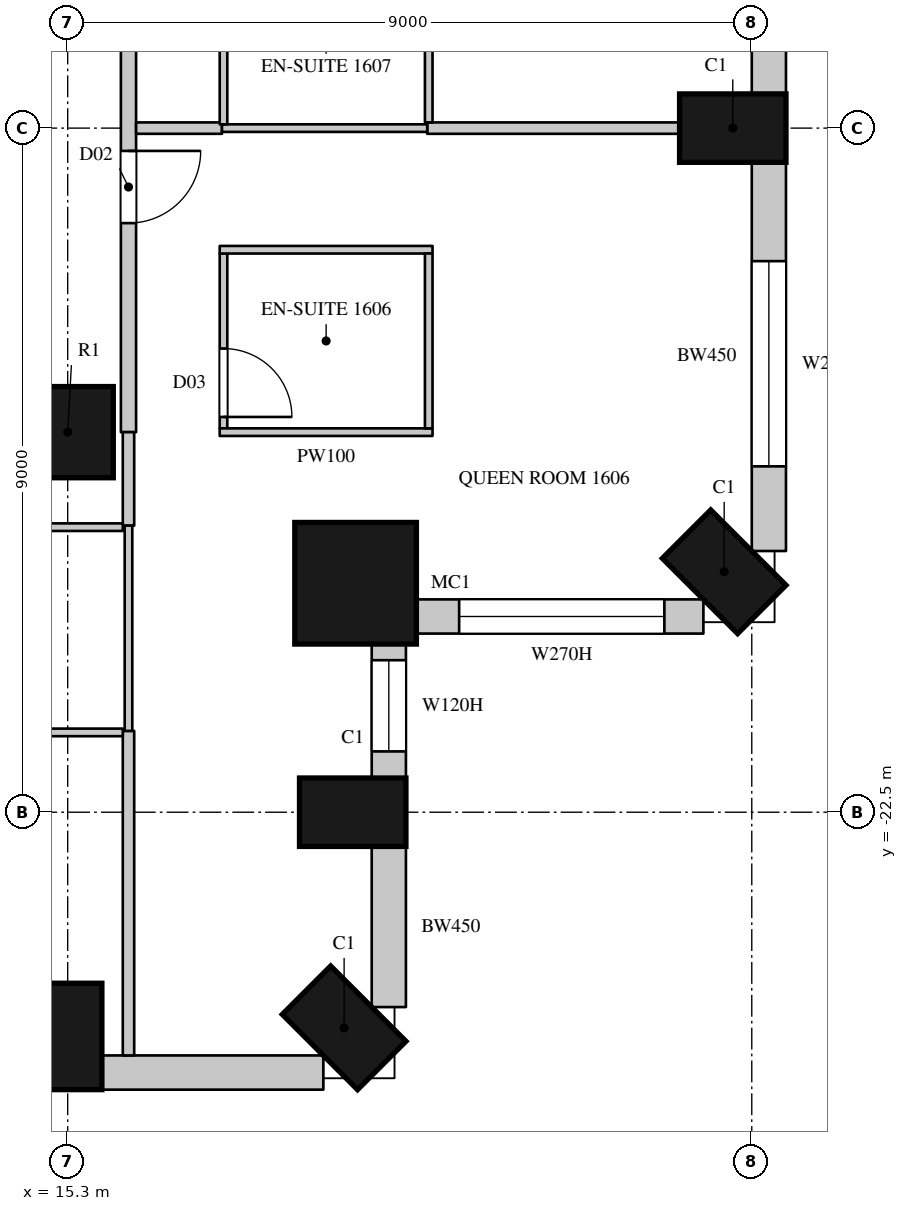
"""IFC4 building model, lengths in metres.
Left out: names, types, materials, properties, quantities, classifications, styles, units other than length and angle.
Written with IfcOpenShell. Run it as: python <this file> out.ifc"""

import sys

from ifc_helpers import new_model, si_unit, direction, frame, frame_2d, origin, origin_2d, place, context, subcontext, project, spatial, rectangle, circle, extrude, element, fill, save


model = new_model("IFC4")
c1 = context("Model", 3, precision=1e-05, world=origin(), true_north=direction((0.0, 1.0)))
c2 = subcontext(c1, "Body", "Model", "MODEL_VIEW")
j1 = project(units=[si_unit("LENGTHUNIT", "METRE"), si_unit("PLANEANGLEUNIT", "RADIAN")], contexts=[c1])
p1 = place(None, origin())
s1 = spatial("IfcSite", under=j1, at=p1, CompositionType="ELEMENT")
p2 = place(p1, origin())
s2 = spatial("IfcBuilding", under=s1, at=p2, CompositionType="ELEMENT")
p3 = place(p2, frame((0.0, 0.0, 87.9)))
s3 = spatial("IfcBuildingStorey", under=s2, at=p3, CompositionType="ELEMENT", Elevation=87.9)
for number, where, z_axis, x_axis in (
    (1, (15.3, -25.45, 0.0), (0.0, 0.0, 1.0), (1.0, 0.0, 0.0)),
    (2, (18.937, -25.337, 0.0), (0.0, 0.0, 1.0), (0.707, 0.707, 0.0)),
    (3, (19.05, -22.5, 0.0), (0.0, 0.0, 1.0), (0.0, 1.0, 0.0)),
):
    element("IfcColumn", number, at=place(p3, frame(where, z_axis=z_axis, x_axis=x_axis)), inside=s3, PredefinedType="COLUMN", context=c2, shape_type="SweptSolid", body=[
        extrude(rectangle(XDim=0.9, YDim=1.4, at=origin_2d()), origin(), (0.0, 0.0, 1.0), 3.6),
    ])
p4 = place(p3, frame((19.088, -19.488, 0.0), z_axis=(0.0, 0.0, 1.0), x_axis=(1.0, 0.0, 0.0)))
e4 = element("IfcColumn", 4, at=p4, inside=s3, PredefinedType="COLUMN", context=c2, shape_type="SweptSolid", body=[
    extrude(circle(Radius=0.8, at=origin_2d()), origin(), (0.0, 0.0, 1.0), 3.6),
])
for number, where, z_axis, x_axis in (
    (5, (23.937, -19.337, 0.0), (0.0, 0.0, 1.0), (0.707, 0.707, 0.0)),
    (6, (24.05, -13.5, 0.0), (0.0, 0.0, 1.0), (0.0, 1.0, 0.0)),
):
    element("IfcColumn", number, at=place(p3, frame(where, z_axis=z_axis, x_axis=x_axis)), inside=s3, PredefinedType="COLUMN", context=c2, shape_type="SweptSolid", body=[
        extrude(rectangle(XDim=0.9, YDim=1.4, at=origin_2d()), origin(), (0.0, 0.0, 1.0), 3.6),
    ])
p5 = place(p3, frame((15.3, -17.5, 0.0), z_axis=(0.0, 0.0, 1.0), x_axis=(1.0, 0.0, 0.0)))
e7 = element("IfcColumn", 7, at=p5, inside=s3, PredefinedType="COLUMN", context=c2, shape_type="SweptSolid", body=[
    extrude(circle(Radius=0.6, at=origin_2d()), origin(), (0.0, 0.0, 1.0), 3.6),
])
p6 = place(p3, frame((15.75, -25.925, 0.0), z_axis=(0.0, 0.0, 1.0), x_axis=(1.0, 0.0, 0.0)))
e8 = element("IfcWall", 8, at=p6, inside=s3, PredefinedType="SOLIDWALL", context=c2, shape_type="SweptSolid", body=[
    extrude(rectangle(XDim=2.914, YDim=0.45, at=frame_2d((1.457, 0.0))), origin(), (0.0, 0.0, 1.0), 3.3),
])
p7 = place(p3, frame((19.525, -25.064, 0.0), z_axis=(0.0, 0.0, 1.0), x_axis=(0.0, 1.0, 0.0)))
e9 = element("IfcWall", 9, at=p7, inside=s3, PredefinedType="SOLIDWALL", context=c2, shape_type="SweptSolid", body=[
    extrude(rectangle(XDim=2.114, YDim=0.45, at=frame_2d((1.057, 0.0))), origin(), (0.0, 0.0, 1.0), 3.3),
])
p8 = place(p3, frame((19.525, -22.05, 0.0), z_axis=(0.0, 0.0, 1.0), x_axis=(0.0, 1.0, 0.0)))
e10 = element("IfcWall", 10, at=p8, inside=s3, PredefinedType="SOLIDWALL", context=c2, shape_type="SweptSolid", body=[
    extrude(rectangle(XDim=1.792, YDim=0.45, at=frame_2d((0.896, 0.0))), origin(), (0.0, 0.0, 1.0), 3.3),
])
p9 = place(p8, frame((0.35, 0.0, 1.05)))
e11 = element("IfcOpeningElement", 11, at=p9, cuts=e10, PredefinedType="OPENING", context=c2, shape_type="SweptSolid", body=[
    extrude(rectangle(XDim=1.2, YDim=2.0, at=frame_2d((0.6, 1.0))), frame((0.0, 0.235, 0.0), z_axis=(0.0, -1.0, 0.0), x_axis=(1.0, 0.0, 0.0)), (0.0, 0.0, 1.0), 0.47),
])
p10 = place(p3, frame((19.858, -19.925, 0.0), z_axis=(0.0, 0.0, 1.0), x_axis=(1.0, 0.0, 0.0)))
e12 = element("IfcWall", 12, at=p10, inside=s3, PredefinedType="SOLIDWALL", context=c2, shape_type="SweptSolid", body=[
    extrude(rectangle(XDim=3.805, YDim=0.45, at=frame_2d((1.903, 0.0))), origin(), (0.0, 0.0, 1.0), 3.3),
])
p11 = place(p10, frame((0.592, 0.0, 1.05)))
e13 = element("IfcOpeningElement", 13, at=p11, cuts=e12, PredefinedType="OPENING", context=c2, shape_type="SweptSolid", body=[
    extrude(rectangle(XDim=2.7, YDim=2.0, at=frame_2d((1.35, 1.0))), frame((0.0, 0.235, 0.0), z_axis=(0.0, -1.0, 0.0), x_axis=(1.0, 0.0, 0.0)), (0.0, 0.0, 1.0), 0.47),
])
p12 = place(p3, frame((24.525, -19.064, 0.0), z_axis=(0.0, 0.0, 1.0), x_axis=(0.0, 1.0, 0.0)))
e14 = element("IfcWall", 14, at=p12, inside=s3, PredefinedType="SOLIDWALL", context=c2, shape_type="SweptSolid", body=[
    extrude(rectangle(XDim=5.114, YDim=0.45, at=frame_2d((2.557, 0.0))), origin(), (0.0, 0.0, 1.0), 3.3),
])
p13 = place(p12, frame((1.114, 0.0, 1.05)))
e15 = element("IfcOpeningElement", 15, at=p13, cuts=e14, PredefinedType="OPENING", context=c2, shape_type="SweptSolid", body=[
    extrude(rectangle(XDim=2.7, YDim=2.0, at=frame_2d((1.35, 1.0))), frame((0.0, 0.235, 0.0), z_axis=(0.0, -1.0, 0.0), x_axis=(1.0, 0.0, 0.0)), (0.0, 0.0, 1.0), 0.47),
])
p14 = place(p3, frame((24.525, -13.05, 0.0), z_axis=(0.0, 0.0, 1.0), x_axis=(0.0, 1.0, 0.0)))
e16 = element("IfcWall", 16, at=p14, inside=s3, PredefinedType="SOLIDWALL", context=c2, shape_type="SweptSolid", body=[
    extrude(rectangle(XDim=8.1, YDim=0.45, at=frame_2d((4.05, 0.0))), origin(), (0.0, 0.0, 1.0), 3.3),
])
p15 = place(p14, frame((0.9, 0.0, 0.0)))
e17 = element("IfcOpeningElement", 17, at=p15, cuts=e16, PredefinedType="OPENING", context=c2, shape_type="SweptSolid", body=[
    extrude(rectangle(XDim=1.8, YDim=2.4, at=frame_2d((0.9, 1.2))), frame((0.0, 0.235, 0.0), z_axis=(0.0, -1.0, 0.0), x_axis=(1.0, 0.0, 0.0)), (0.0, 0.0, 1.0), 0.47),
])
p16 = place(p14, frame((4.7, 0.0, 0.0)))
e18 = element("IfcOpeningElement", 18, at=p16, cuts=e16, PredefinedType="OPENING", context=c2, shape_type="SweptSolid", body=[
    extrude(rectangle(XDim=1.8, YDim=2.4, at=frame_2d((0.9, 1.2))), frame((0.0, 0.235, 0.0), z_axis=(0.0, -1.0, 0.0), x_axis=(1.0, 0.0, 0.0)), (0.0, 0.0, 1.0), 0.47),
])
p17 = place(p14, frame((6.7, 0.0, 1.05)))
e19 = element("IfcOpeningElement", 19, at=p17, cuts=e16, PredefinedType="OPENING", context=c2, shape_type="SweptSolid", body=[
    extrude(rectangle(XDim=1.2, YDim=2.0, at=frame_2d((0.6, 1.0))), frame((0.0, 0.235, 0.0), z_axis=(0.0, -1.0, 0.0), x_axis=(1.0, 0.0, 0.0)), (0.0, 0.0, 1.0), 0.47),
])
p18 = place(p3, frame((16.1, -17.5, 0.0), z_axis=(0.0, 0.0, 1.0), x_axis=(0.0, 1.0, 0.0)))
e20 = element("IfcWall", 20, at=p18, inside=s3, PredefinedType="PARTITIONING", context=c2, shape_type="SweptSolid", body=[
    extrude(rectangle(XDim=12.75, YDim=0.2, at=frame_2d((6.375, 0.0))), origin(), (0.0, 0.0, 1.0), 3.3),
])
p19 = place(p18, frame((2.75, 0.0, 0.0)))
e21 = element("IfcOpeningElement", 21, at=p19, cuts=e20, PredefinedType="OPENING", context=c2, shape_type="SweptSolid", body=[
    extrude(rectangle(XDim=0.95, YDim=2.2, at=frame_2d((0.475, 1.1))), frame((0.0, 0.11, 0.0), z_axis=(0.0, -1.0, 0.0), x_axis=(1.0, 0.0, 0.0)), (0.0, 0.0, 1.0), 0.22),
])
p20 = place(p18, frame((6.95, 0.0, 0.0)))
e22 = element("IfcOpeningElement", 22, at=p20, cuts=e20, PredefinedType="OPENING", context=c2, shape_type="SweptSolid", body=[
    extrude(rectangle(XDim=0.95, YDim=2.2, at=frame_2d((0.475, 1.1))), frame((0.0, 0.11, 0.0), z_axis=(0.0, -1.0, 0.0), x_axis=(1.0, 0.0, 0.0)), (0.0, 0.0, 1.0), 0.22),
])
p21 = place(p18, frame((11.4, 0.0, 0.0)))
e23 = element("IfcOpeningElement", 23, at=p21, cuts=e20, PredefinedType="OPENING", context=c2, shape_type="SweptSolid", body=[
    extrude(rectangle(XDim=0.95, YDim=2.2, at=frame_2d((0.475, 1.1))), frame((0.0, 0.11, 0.0), z_axis=(0.0, -1.0, 0.0), x_axis=(1.0, 0.0, 0.0)), (0.0, 0.0, 1.0), 0.22),
])
p22 = place(p3, frame((16.1, -25.7, 0.0), z_axis=(0.0, 0.0, 1.0), x_axis=(0.0, 1.0, 0.0)))
e24 = element("IfcWall", 24, at=p22, inside=s3, PredefinedType="PARTITIONING", context=c2, shape_type="SweptSolid", body=[
    extrude(rectangle(XDim=4.27, YDim=0.15, at=frame_2d((2.135, 0.0))), origin(), (0.0, 0.0, 1.0), 3.3),
])
p23 = place(p3, frame((16.1, -18.73, 0.0), z_axis=(0.0, 0.0, 1.0), x_axis=(0.0, 1.0, 0.0)))
e25 = element("IfcWall", 25, at=p23, inside=s3, PredefinedType="PARTITIONING", context=c2, shape_type="SweptSolid", body=[
    extrude(rectangle(XDim=1.23, YDim=0.15, at=frame_2d((0.615, 0.0))), origin(), (0.0, 0.0, 1.0), 3.3),
])
p24 = place(p3, frame((16.2, -13.5, 0.0), z_axis=(0.0, 0.0, 1.0), x_axis=(1.0, 0.0, 0.0)))
e26 = element("IfcWall", 26, at=p24, inside=s3, PredefinedType="PARTITIONING", context=c2, shape_type="SweptSolid", body=[
    extrude(rectangle(XDim=1.13, YDim=0.15, at=frame_2d((0.565, 0.0))), origin(), (0.0, 0.0, 1.0), 3.3),
])
p25 = place(p3, frame((20.03, -13.5, 0.0), z_axis=(0.0, 0.0, 1.0), x_axis=(1.0, 0.0, 0.0)))
e27 = element("IfcWall", 27, at=p25, inside=s3, PredefinedType="PARTITIONING", context=c2, shape_type="SweptSolid", body=[
    extrude(rectangle(XDim=3.32, YDim=0.15, at=frame_2d((1.66, 0.0))), origin(), (0.0, 0.0, 1.0), 3.3),
])
for number, where, z_axis, x_axis in (
    (28, (13.65, -21.45, 0.0), (0.0, 0.0, 1.0), (1.0, 0.0, 0.0)),
    (29, (13.65, -18.75, 0.0), (0.0, 0.0, 1.0), (1.0, 0.0, 0.0)),
):
    element("IfcWall", number, at=place(p3, frame(where, z_axis=z_axis, x_axis=x_axis)), inside=s3, PredefinedType="PARTITIONING", context=c2, shape_type="SweptSolid", body=[
        extrude(rectangle(XDim=2.375, YDim=0.1, at=frame_2d((1.188, 0.0))), origin(), (0.0, 0.0, 1.0), 3.3),
    ])
for number, where, z_axis, x_axis in (
    (30, (16.1, -21.43, 0.0), (0.0, 0.0, 1.0), (0.0, 1.0, 0.0)),
    (31, (17.33, -13.5, 0.0), (0.0, 0.0, 1.0), (1.0, 0.0, 0.0)),
):
    element("IfcWall", number, at=place(p3, frame(where, z_axis=z_axis, x_axis=x_axis)), inside=s3, PredefinedType="PARTITIONING", context=c2, shape_type="SweptSolid", body=[
        extrude(rectangle(XDim=2.7, YDim=0.1, at=frame_2d((1.35, 0.0))), origin(), (0.0, 0.0, 1.0), 3.3),
    ])
p26 = place(p3, frame((17.35, -17.45, 0.0), z_axis=(0.0, 0.0, 1.0), x_axis=(0.0, 1.0, 0.0)))
e32 = element("IfcWall", 32, at=p26, inside=s3, PredefinedType="PARTITIONING", context=c2, shape_type="SweptSolid", body=[
    extrude(rectangle(XDim=2.3, YDim=0.1, at=frame_2d((1.15, 0.0))), origin(), (0.0, 0.0, 1.0), 3.3),
])
p27 = place(p26, frame((0.15, 0.0, 0.0)))
e33 = element("IfcOpeningElement", 33, at=p27, cuts=e32, PredefinedType="OPENING", context=c2, shape_type="SweptSolid", body=[
    extrude(rectangle(XDim=0.9, YDim=2.2, at=frame_2d((0.45, 1.1))), frame((0.0, 0.06, 0.0), z_axis=(0.0, -1.0, 0.0), x_axis=(1.0, 0.0, 0.0)), (0.0, 0.0, 1.0), 0.12),
])
for number, where, z_axis, x_axis in (
    (34, (17.3, -17.5, 0.0), (0.0, 0.0, 1.0), (1.0, 0.0, 0.0)),
    (35, (17.3, -15.1, 0.0), (0.0, 0.0, 1.0), (1.0, 0.0, 0.0)),
):
    element("IfcWall", number, at=place(p3, frame(where, z_axis=z_axis, x_axis=x_axis)), inside=s3, PredefinedType="PARTITIONING", context=c2, shape_type="SweptSolid", body=[
        extrude(rectangle(XDim=2.8, YDim=0.1, at=frame_2d((1.4, 0.0))), origin(), (0.0, 0.0, 1.0), 3.3),
    ])
p28 = place(p3, frame((17.35, -13.45, 0.0), z_axis=(0.0, 0.0, 1.0), x_axis=(0.0, 1.0, 0.0)))
e36 = element("IfcWall", 36, at=p28, inside=s3, PredefinedType="PARTITIONING", context=c2, shape_type="SweptSolid", body=[
    extrude(rectangle(XDim=2.296, YDim=0.1, at=frame_2d((1.148, 0.0))), origin(), (0.0, 0.0, 1.0), 3.3),
])
p29 = place(p28, frame((1.2, 0.0, 0.0)))
e37 = element("IfcOpeningElement", 37, at=p29, cuts=e36, PredefinedType="OPENING", context=c2, shape_type="SweptSolid", body=[
    extrude(rectangle(XDim=0.9, YDim=2.2, at=frame_2d((0.45, 1.1))), frame((0.0, 0.06, 0.0), z_axis=(0.0, -1.0, 0.0), x_axis=(1.0, 0.0, 0.0)), (0.0, 0.0, 1.0), 0.12),
])
p30 = place(p3, frame((20.05, -17.45, 0.0), z_axis=(0.0, 0.0, 1.0), x_axis=(0.0, 1.0, 0.0)))
e38 = element("IfcWall", 38, at=p30, inside=s3, PredefinedType="PARTITIONING", context=c2, shape_type="SweptSolid", body=[
    extrude(rectangle(XDim=2.3, YDim=0.1, at=frame_2d((1.15, 0.0))), origin(), (0.0, 0.0, 1.0), 3.3),
])
p31 = place(p3, frame((20.05, -13.425, 0.0), z_axis=(0.0, 0.0, 1.0), x_axis=(0.0, 1.0, 0.0)))
e39 = element("IfcWall", 39, at=p31, inside=s3, PredefinedType="PARTITIONING", context=c2, shape_type="SweptSolid", body=[
    extrude(rectangle(XDim=2.271, YDim=0.1, at=frame_2d((1.135, 0.0))), origin(), (0.0, 0.0, 1.0), 3.3),
])
p32 = place(p9, origin())
e40 = element("IfcWindow", 40, at=p32, inside=s3, PartitioningType="SINGLE_PANEL", PredefinedType="WINDOW", context=c2, shape_type="SweptSolid", body=[
    extrude(rectangle(XDim=1.2, YDim=2.0, at=frame_2d((0.6, 1.0))), frame((0.0, 0.135, 0.0), z_axis=(0.0, -1.0, 0.0), x_axis=(1.0, 0.0, 0.0)), (0.0, 0.0, 1.0), 0.06),
])
fill(e11, e40)
p33 = place(p11, origin())
e41 = element("IfcWindow", 41, at=p33, inside=s3, PartitioningType="SINGLE_PANEL", PredefinedType="WINDOW", context=c2, shape_type="SweptSolid", body=[
    extrude(rectangle(XDim=2.7, YDim=2.0, at=frame_2d((1.35, 1.0))), frame((0.0, 0.135, 0.0), z_axis=(0.0, -1.0, 0.0), x_axis=(1.0, 0.0, 0.0)), (0.0, 0.0, 1.0), 0.06),
])
fill(e13, e41)
p34 = place(p13, origin())
e42 = element("IfcWindow", 42, at=p34, inside=s3, PartitioningType="SINGLE_PANEL", PredefinedType="WINDOW", context=c2, shape_type="SweptSolid", body=[
    extrude(rectangle(XDim=2.7, YDim=2.0, at=frame_2d((1.35, 1.0))), frame((0.0, 0.135, 0.0), z_axis=(0.0, -1.0, 0.0), x_axis=(1.0, 0.0, 0.0)), (0.0, 0.0, 1.0), 0.06),
])
fill(e15, e42)
p35 = place(p19, origin())
e43 = element("IfcDoor", 43, at=p35, inside=s3, OperationType="SINGLE_SWING_LEFT", PredefinedType="DOOR", context=c2, shape_type="SweptSolid", body=[
    extrude(rectangle(XDim=0.95, YDim=2.2, at=frame_2d((0.475, 1.1))), frame((0.0, 0.025, 0.0), z_axis=(0.0, -1.0, 0.0), x_axis=(1.0, 0.0, 0.0)), (0.0, 0.0, 1.0), 0.05),
])
fill(e21, e43)
p36 = place(p27, origin())
e44 = element("IfcDoor", 44, at=p36, inside=s3, OperationType="SINGLE_SWING_RIGHT", PredefinedType="DOOR", context=c2, shape_type="SweptSolid", body=[
    extrude(rectangle(XDim=0.9, YDim=2.2, at=frame_2d((0.45, 1.1))), frame((0.0, 0.025, 0.0), z_axis=(0.0, -1.0, 0.0), x_axis=(1.0, 0.0, 0.0)), (0.0, 0.0, 1.0), 0.05),
])
fill(e33, e44)
save(model, sys.argv[1])
